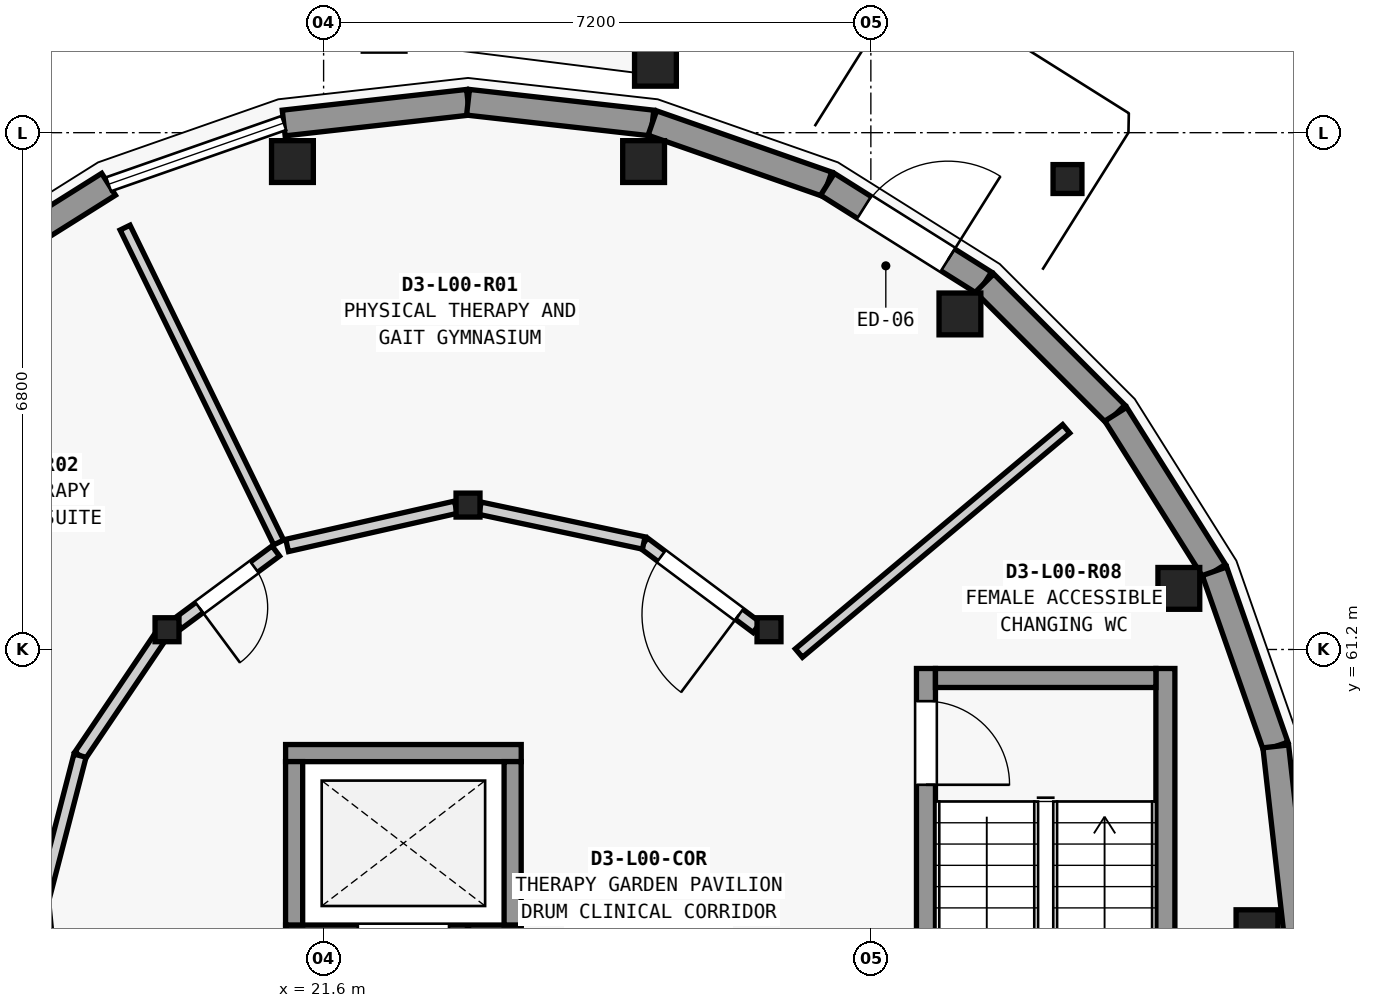
"""IFC4 building model, lengths in metres.
Left out: names, types, materials, properties, quantities, classifications, styles, units other than length and angle.
Written with IfcOpenShell. Run it as: python <this file> out.ifc"""

import sys

from ifc_helpers import new_model, si_unit, direction, frame, frame_2d, origin, origin_2d, place, context, subcontext, project, spatial, rectangle, circle, extrude, element, fill, save


model = new_model("IFC4")
c1 = context("Model", 3, precision=1e-05, world=origin(), true_north=direction((0.0, 1.0)))
c2 = subcontext(c1, "Body", "Model", "MODEL_VIEW")
j1 = project(units=[si_unit("LENGTHUNIT", "METRE"), si_unit("PLANEANGLEUNIT", "RADIAN")], contexts=[c1])
p1 = place(None, origin())
s1 = spatial("IfcSite", under=j1, at=p1, CompositionType="ELEMENT")
p2 = place(p1, origin())
s2 = spatial("IfcBuilding", under=s1, at=p2, CompositionType="ELEMENT")
p3 = place(p2, origin())
s3 = spatial("IfcBuildingStorey", under=s2, at=p3, CompositionType="ELEMENT", Elevation=0.0)
for number, where, z_axis, x_axis in (
    (1, (33.88, 57.5, 0.0), (0.0, 0.0, 1.0), (1.0, 0.0, 0.0)),
    (2, (32.852, 62.004, 0.0), (0.0, 0.0, 1.0), (1.0, 0.0, 0.0)),
    (3, (29.972, 65.615, 0.0), (0.0, 0.0, 1.0), (1.0, 0.0, 0.0)),
    (4, (25.81, 67.62, 0.0), (0.0, 0.0, 1.0), (1.0, 0.0, 0.0)),
    (5, (21.19, 67.62, 0.0), (0.0, 0.0, 1.0), (1.0, 0.0, 0.0)),
):
    element("IfcColumn", number, at=place(p3, frame(where, z_axis=z_axis, x_axis=x_axis)), inside=s3, PredefinedType="PILASTER", context=c2, shape_type="SweptSolid", body=[
        extrude(circle(Radius=0.275, at=origin_2d()), origin(), (0.0, 0.0, 1.0), 4.55),
    ])
for number, where, z_axis, x_axis in (
    (6, (27.46, 61.46, 0.0), (0.0, 0.0, 1.0), (1.0, 0.0, 0.0)),
    (7, (23.5, 63.1, 0.0), (0.0, 0.0, 1.0), (1.0, 0.0, 0.0)),
    (8, (19.54, 61.46, 0.0), (0.0, 0.0, 1.0), (1.0, 0.0, 0.0)),
):
    element("IfcColumn", number, at=place(p3, frame(where, z_axis=z_axis, x_axis=x_axis)), inside=s3, PredefinedType="COLUMN", context=c2, shape_type="SweptSolid", body=[
        extrude(rectangle(XDim=0.315, YDim=0.315, at=origin_2d()), origin(), (0.0, 0.0, 1.0), 4.55),
    ])
p4 = place(p3, frame((25.966, 68.887, 0.0), z_axis=(0.0, 0.0, 1.0), x_axis=(1.0, 0.0, 0.0)))
e9 = element("IfcColumn", 9, at=p4, inside=s3, PredefinedType="PILASTER", context=c2, shape_type="SweptSolid", body=[
    extrude(circle(Radius=0.275, at=origin_2d()), origin(), (0.0, 0.0, 1.0), 4.55),
])
p5 = place(p3, frame((31.387, 67.39, 1.15), z_axis=(0.0, 0.0, 1.0), x_axis=(1.0, 0.0, 0.0)))
e10 = element("IfcColumn", 10, at=p5, inside=s3, PredefinedType="PILASTER", context=c2, shape_type="SweptSolid", body=[
    extrude(circle(Radius=0.19, at=origin_2d()), origin(), (0.0, 0.0, 1.0), 3.4),
])
p6 = place(p3, frame((16.704, 66.022, 0.0), z_axis=(0.0, 0.0, 1.0), x_axis=(0.846658434148, 0.532136726684, 0.0)))
e11 = element("IfcWall", 11, at=p6, inside=s3, PredefinedType="SOLIDWALL", context=c2, shape_type="SweptSolid", body=[
    extrude(rectangle(XDim=2.441, YDim=0.34, at=frame_2d((1.221, 0.0))), origin(), (0.0, 0.0, 1.0), 3.659),
])
for number, where, z_axis, x_axis in (
    (12, (21.075, 68.127, 0.0), (0.0, 0.0, 1.0), (0.994, 0.112, 0.0)),
    (13, (23.5, 68.4, 0.0), (0.0, 0.0, 1.0), (0.994, -0.112, 0.0)),
):
    element("IfcWall", number, at=place(p3, frame(where, z_axis=z_axis, x_axis=x_axis)), inside=s3, PredefinedType="SOLIDWALL", context=c2, shape_type="SweptSolid", body=[
        extrude(rectangle(XDim=2.44, YDim=0.34, at=frame_2d((1.22, 0.0))), origin(), (0.0, 0.0, 1.0), 3.659),
    ])
p7 = place(p3, frame((25.925, 68.127, 0.0), z_axis=(0.0, 0.0, 1.0), x_axis=(0.943919156274, -0.330176659411, 0.0)))
e14 = element("IfcWall", 14, at=p7, inside=s3, PredefinedType="SOLIDWALL", context=c2, shape_type="SweptSolid", body=[
    extrude(rectangle(XDim=2.441, YDim=0.34, at=frame_2d((1.22, 0.0))), origin(), (0.0, 0.0, 1.0), 3.659),
])
p8 = place(p3, frame((28.229, 67.321, 0.0), z_axis=(0.0, 0.0, 1.0), x_axis=(0.846658434148, -0.532136726684, 0.0)))
e15 = element("IfcWall", 15, at=p8, inside=s3, PredefinedType="SOLIDWALL", context=c2, shape_type="SweptSolid", body=[
    extrude(rectangle(XDim=2.441, YDim=0.34, at=frame_2d((1.221, 0.0))), origin(), (0.0, 0.0, 1.0), 3.659),
])
p9 = place(p8, frame((0.571, 0.0, 0.0)))
e16 = element("IfcOpeningElement", 16, at=p9, cuts=e15, PredefinedType="OPENING", context=c2, shape_type="SweptSolid", body=[
    extrude(rectangle(XDim=1.3, YDim=2.25, at=frame_2d((0.65, 1.125))), frame((0.0, 0.18, 0.0), z_axis=(0.0, -1.0, 0.0), x_axis=(1.0, 0.0, 0.0)), (0.0, 0.0, 1.0), 0.36),
])
p10 = place(p3, frame((30.296, 66.022, 0.0), z_axis=(0.0, 0.0, 1.0), x_axis=(0.707106781187, -0.707106781187, 0.0)))
e17 = element("IfcWall", 17, at=p10, inside=s3, PredefinedType="SOLIDWALL", context=c2, shape_type="SweptSolid", body=[
    extrude(rectangle(XDim=2.441, YDim=0.34, at=frame_2d((1.22, 0.0))), origin(), (0.0, 0.0, 1.0), 3.659),
])
p11 = place(p3, frame((32.022, 64.296, 0.0), z_axis=(0.0, 0.0, 1.0), x_axis=(0.532136726684, -0.846658434148, 0.0)))
e18 = element("IfcWall", 18, at=p11, inside=s3, PredefinedType="SOLIDWALL", context=c2, shape_type="SweptSolid", body=[
    extrude(rectangle(XDim=2.441, YDim=0.34, at=frame_2d((1.221, 0.0))), origin(), (0.0, 0.0, 1.0), 3.659),
])
p12 = place(p3, frame((33.321, 62.229, 0.0), z_axis=(0.0, 0.0, 1.0), x_axis=(0.330176659411, -0.943919156274, 0.0)))
e19 = element("IfcWall", 19, at=p12, inside=s3, PredefinedType="SOLIDWALL", context=c2, shape_type="SweptSolid", body=[
    extrude(rectangle(XDim=2.441, YDim=0.34, at=frame_2d((1.22, 0.0))), origin(), (0.0, 0.0, 1.0), 3.659),
])
p13 = place(p3, frame((34.127, 59.925, 0.0), z_axis=(0.0, 0.0, 1.0), x_axis=(0.111847873866, -0.993725340882, 0.0)))
e20 = element("IfcWall", 20, at=p13, inside=s3, PredefinedType="SOLIDWALL", context=c2, shape_type="SweptSolid", body=[
    extrude(rectangle(XDim=2.44, YDim=0.34, at=frame_2d((1.22, 0.0))), origin(), (0.0, 0.0, 1.0), 3.659),
])
p14 = place(p3, frame((29.525, 60.95, 0.0), z_axis=(0.0, 0.0, 1.0), x_axis=(0.0, -1.0, 0.0)))
e21 = element("IfcWall", 21, at=p14, inside=s3, PredefinedType="SHEAR", context=c2, shape_type="SweptSolid", body=[
    extrude(rectangle(XDim=6.9, YDim=0.25, at=frame_2d((3.45, 0.0))), origin(), (0.0, 0.0, 1.0), 4.305),
])
p15 = place(p14, frame((0.43, 0.0, 0.0)))
e22 = element("IfcOpeningElement", 22, at=p15, cuts=e21, PredefinedType="OPENING", context=c2, shape_type="SweptSolid", body=[
    extrude(rectangle(XDim=1.1, YDim=2.15, at=frame_2d((0.55, 1.075))), frame((0.0, 0.135, 0.0), z_axis=(0.0, -1.0, 0.0), x_axis=(1.0, 0.0, 0.0)), (0.0, 0.0, 1.0), 0.27),
])
p16 = place(p3, frame((32.675, 60.95, 0.0), z_axis=(0.0, 0.0, 1.0), x_axis=(0.0, -1.0, 0.0)))
e23 = element("IfcWall", 23, at=p16, inside=s3, PredefinedType="SHEAR", context=c2, shape_type="SweptSolid", body=[
    extrude(rectangle(XDim=6.9, YDim=0.25, at=frame_2d((3.45, 0.0))), origin(), (0.0, 0.0, 1.0), 4.305),
])
p17 = place(p3, frame((29.65, 60.825, 0.0), z_axis=(0.0, 0.0, 1.0), x_axis=(1.0, 0.0, 0.0)))
e24 = element("IfcWall", 24, at=p17, inside=s3, PredefinedType="SHEAR", context=c2, shape_type="SweptSolid", body=[
    extrude(rectangle(XDim=2.9, YDim=0.25, at=frame_2d((1.45, 0.0))), origin(), (0.0, 0.0, 1.0), 4.305),
])
p18 = place(p3, frame((21.1, 57.462, 0.0), z_axis=(0.0, 0.0, 1.0), x_axis=(1.0, 0.0, 0.0)))
e25 = element("IfcWall", 25, at=p18, inside=s3, PredefinedType="SHEAR", context=c2, shape_type="SweptSolid", body=[
    extrude(rectangle(XDim=3.1, YDim=0.225, at=frame_2d((1.55, 0.0))), origin(), (0.0, 0.0, 1.0), 4.305),
])
p19 = place(p18, frame((0.95, 0.0, 0.0)))
e26 = element("IfcOpeningElement", 26, at=p19, cuts=e25, PredefinedType="OPENING", context=c2, shape_type="SweptSolid", body=[
    extrude(rectangle(XDim=1.2, YDim=2.2, at=frame_2d((0.6, 1.1))), frame((0.0, 0.123, 0.0), z_axis=(0.0, -1.0, 0.0), x_axis=(1.0, 0.0, 0.0)), (0.0, 0.0, 1.0), 0.245),
])
p20 = place(p3, frame((21.1, 59.837, 0.0), z_axis=(0.0, 0.0, 1.0), x_axis=(1.0, 0.0, 0.0)))
e27 = element("IfcWall", 27, at=p20, inside=s3, PredefinedType="SHEAR", context=c2, shape_type="SweptSolid", body=[
    extrude(rectangle(XDim=3.1, YDim=0.225, at=frame_2d((1.55, 0.0))), origin(), (0.0, 0.0, 1.0), 4.305),
])
for number, where, z_axis, x_axis in (
    (28, (21.212, 57.575, 0.0), (0.0, 0.0, 1.0), (0.0, 1.0, 0.0)),
    (29, (24.087, 57.575, 0.0), (0.0, 0.0, 1.0), (0.0, 1.0, 0.0)),
):
    element("IfcWall", number, at=place(p3, frame(where, z_axis=z_axis, x_axis=x_axis)), inside=s3, PredefinedType="SHEAR", context=c2, shape_type="SweptSolid", body=[
        extrude(rectangle(XDim=2.15, YDim=0.225, at=frame_2d((1.075, 0.0))), origin(), (0.0, 0.0, 1.0), 4.305),
    ])
p21 = place(p3, frame((27.853, 61.153, 0.0), z_axis=(0.0, 0.0, 1.0), x_axis=(0.766177182771, 0.64262938355, 0.0)))
e30 = element("IfcWall", 30, at=p21, inside=s3, PredefinedType="PARTITIONING", context=c2, shape_type="SweptSolid", body=[
    extrude(rectangle(XDim=4.59, YDim=0.145, at=frame_2d((2.295, 0.0))), origin(), (0.0, 0.0, 1.0), 3.634),
])
p22 = place(p3, frame((21.009, 62.608, 0.0), z_axis=(0.0, 0.0, 1.0), x_axis=(-0.438421545089, 0.898769463657, 0.0)))
e31 = element("IfcWall", 31, at=p22, inside=s3, PredefinedType="PARTITIONING", context=c2, shape_type="SweptSolid", body=[
    extrude(rectangle(XDim=4.61, YDim=0.145, at=frame_2d((2.305, 0.0))), origin(), (0.0, 0.0, 1.0), 3.634),
])
p23 = place(p3, frame((27.3, 61.489, 0.0), z_axis=(0.0, 0.0, 1.0), x_axis=(-0.801023932766, 0.598632323831, 0.0)))
e32 = element("IfcWall", 32, at=p23, inside=s3, PredefinedType="PARTITIONING", context=c2, shape_type="SweptSolid", body=[
    extrude(rectangle(XDim=1.858, YDim=0.165, at=frame_2d((0.929, 0.0))), origin(), (0.0, 0.0, 1.0), 3.634),
])
p24 = place(p23, frame((0.289, 0.0, 0.0)))
e33 = element("IfcOpeningElement", 33, at=p24, cuts=e32, PredefinedType="OPENING", context=c2, shape_type="SweptSolid", body=[
    extrude(rectangle(XDim=1.28, YDim=2.3, at=frame_2d((0.64, 1.15))), frame((0.0, 0.093, 0.0), z_axis=(0.0, -1.0, 0.0), x_axis=(1.0, 0.0, 0.0)), (0.0, 0.0, 1.0), 0.185),
])
p25 = place(p3, frame((25.812, 62.601, 0.0), z_axis=(0.0, 0.0, 1.0), x_axis=(-0.978152936259, 0.207886587563, 0.0)))
e34 = element("IfcWall", 34, at=p25, inside=s3, PredefinedType="PARTITIONING", context=c2, shape_type="SweptSolid", body=[
    extrude(rectangle(XDim=2.203, YDim=0.165, at=frame_2d((1.102, 0.0))), origin(), (0.0, 0.0, 1.0), 3.634),
])
p26 = place(p3, frame((23.34, 63.072, 0.0), z_axis=(0.0, 0.0, 1.0), x_axis=(-0.975285396453, -0.2209488526, 0.0)))
e35 = element("IfcWall", 35, at=p26, inside=s3, PredefinedType="PARTITIONING", context=c2, shape_type="SweptSolid", body=[
    extrude(rectangle(XDim=2.276, YDim=0.165, at=frame_2d((1.138, 0.0))), origin(), (0.0, 0.0, 1.0), 3.634),
])
p27 = place(p3, frame((20.971, 62.496, 0.0), z_axis=(0.0, 0.0, 1.0), x_axis=(-0.803417109956, -0.59541661669, 0.0)))
e36 = element("IfcWall", 36, at=p27, inside=s3, PredefinedType="PARTITIONING", context=c2, shape_type="SweptSolid", body=[
    extrude(rectangle(XDim=1.606, YDim=0.165, at=frame_2d((0.803, 0.0))), origin(), (0.0, 0.0, 1.0), 3.634),
])
p28 = place(p27, frame((0.353, 0.0, 0.0)))
e37 = element("IfcOpeningElement", 37, at=p28, cuts=e36, PredefinedType="OPENING", context=c2, shape_type="SweptSolid", body=[
    extrude(rectangle(XDim=0.9, YDim=2.1, at=frame_2d((0.45, 1.05))), frame((0.0, 0.093, 0.0), z_axis=(0.0, -1.0, 0.0), x_axis=(1.0, 0.0, 0.0)), (0.0, 0.0, 1.0), 0.185),
])
p29 = place(p3, frame((19.432, 61.339, 0.0), z_axis=(0.0, 0.0, 1.0), x_axis=(-0.559463805142, -0.828854782659, 0.0)))
e38 = element("IfcWall", 38, at=p29, inside=s3, PredefinedType="PARTITIONING", context=c2, shape_type="SweptSolid", body=[
    extrude(rectangle(XDim=1.853, YDim=0.165, at=frame_2d((0.927, 0.0))), origin(), (0.0, 0.0, 1.0), 3.634),
])
p30 = place(p3, frame((18.395, 59.803, 0.0), z_axis=(0.0, 0.0, 1.0), x_axis=(-0.251275827958, -0.967915522287, 0.0)))
e39 = element("IfcWall", 39, at=p30, inside=s3, PredefinedType="PARTITIONING", context=c2, shape_type="SweptSolid", body=[
    extrude(rectangle(XDim=1.891, YDim=0.165, at=frame_2d((0.945, 0.0))), origin(), (0.0, 0.0, 1.0), 3.634),
])
p31 = place(p3, frame((17.908, 57.808, 0.0), z_axis=(0.0, 0.0, 1.0), x_axis=(0.097655572539, -0.995220271675, 0.0)))
e40 = element("IfcWall", 40, at=p31, inside=s3, PredefinedType="PARTITIONING", context=c2, shape_type="SweptSolid", body=[
    extrude(rectangle(XDim=1.465, YDim=0.165, at=frame_2d((0.732, 0.0))), origin(), (0.0, 0.0, 1.0), 3.634),
])
p32 = place(p9, origin())
e41 = element("IfcDoor", 41, at=p32, inside=s3, OperationType="SINGLE_SWING_RIGHT", PredefinedType="DOOR", context=c2, shape_type="SweptSolid", body=[
    extrude(rectangle(XDim=1.3, YDim=2.25, at=frame_2d((0.65, 1.125))), frame((0.0, 0.025, 0.0), z_axis=(0.0, -1.0, 0.0), x_axis=(1.0, 0.0, 0.0)), (0.0, 0.0, 1.0), 0.05),
])
fill(e16, e41)
p33 = place(p15, origin())
e42 = element("IfcDoor", 42, at=p33, inside=s3, OperationType="SINGLE_SWING_RIGHT", PredefinedType="DOOR", context=c2, shape_type="SweptSolid", body=[
    extrude(rectangle(XDim=1.1, YDim=2.15, at=frame_2d((0.55, 1.075))), frame((0.0, 0.025, 0.0), z_axis=(0.0, -1.0, 0.0), x_axis=(1.0, 0.0, 0.0)), (0.0, 0.0, 1.0), 0.05),
])
fill(e22, e42)
p34 = place(p24, origin())
e43 = element("IfcDoor", 43, at=p34, inside=s3, OperationType="SINGLE_SWING_LEFT", PredefinedType="DOOR", context=c2, shape_type="SweptSolid", body=[
    extrude(rectangle(XDim=1.28, YDim=2.3, at=frame_2d((0.64, 1.15))), frame((0.0, 0.025, 0.0), z_axis=(0.0, -1.0, 0.0), x_axis=(1.0, 0.0, 0.0)), (0.0, 0.0, 1.0), 0.05),
])
fill(e33, e43)
p35 = place(p28, origin())
e44 = element("IfcDoor", 44, at=p35, inside=s3, OperationType="SINGLE_SWING_RIGHT", PredefinedType="DOOR", context=c2, shape_type="SweptSolid", body=[
    extrude(rectangle(XDim=0.9, YDim=2.1, at=frame_2d((0.45, 1.05))), frame((0.0, 0.025, 0.0), z_axis=(0.0, -1.0, 0.0), x_axis=(1.0, 0.0, 0.0)), (0.0, 0.0, 1.0), 0.05),
])
fill(e37, e44)
save(model, sys.argv[1])
